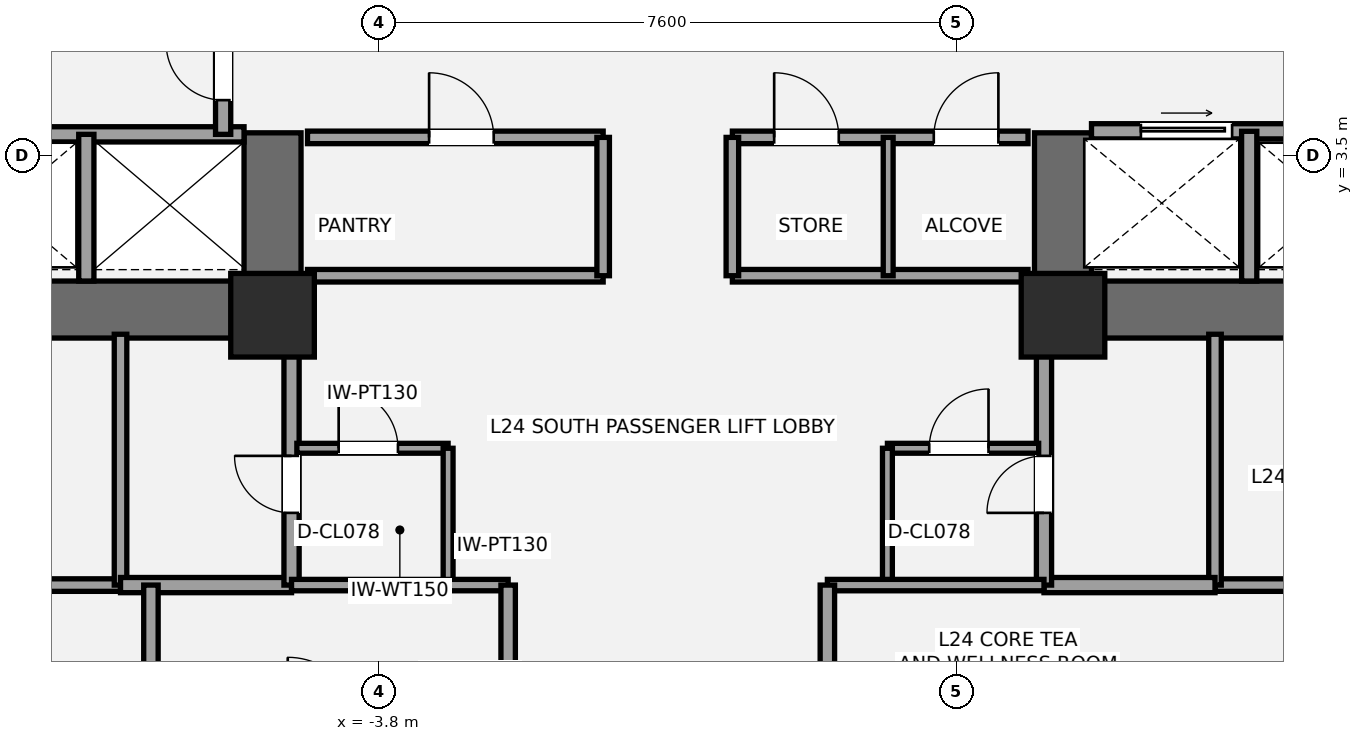
"""IFC4 building model, lengths in metres.
Left out: names, types, materials, properties, quantities, classifications, styles, units other than length and angle.
Written with IfcOpenShell. Run it as: python <this file> out.ifc"""

import sys

from ifc_helpers import new_model, si_unit, direction, frame, frame_2d, origin, origin_2d, place, context, subcontext, project, spatial, rectangle, extrude, element, fill, save


model = new_model("IFC4")
c1 = context("Model", 3, precision=1e-05, world=origin(), true_north=direction((0.0, 1.0)))
c2 = subcontext(c1, "Body", "Model", "MODEL_VIEW")
j1 = project(units=[si_unit("LENGTHUNIT", "METRE"), si_unit("PLANEANGLEUNIT", "RADIAN")], contexts=[c1])
p1 = place(None, origin())
s1 = spatial("IfcSite", under=j1, at=p1, CompositionType="ELEMENT")
p2 = place(p1, origin())
s2 = spatial("IfcBuilding", under=s1, at=p2, CompositionType="ELEMENT")
p3 = place(p2, frame((0.0, 0.0, 93.1)))
s3 = spatial("IfcBuildingStorey", under=s2, at=p3, CompositionType="ELEMENT", Elevation=93.1)
p4 = place(p3, frame((-4.825, 1.475, 0.0), z_axis=(0.0, 0.0, 1.0), x_axis=(-1.0, 0.0, 0.0)))
e1 = element("IfcWall", 1, at=p4, inside=s3, PredefinedType="SHEAR", context=c2, shape_type="SweptSolid", body=[
    extrude(rectangle(XDim=9.075, YDim=0.75, at=frame_2d((4.538, 0.0))), origin(), (0.0, 0.0, 1.0), 3.5),
])
p5 = place(p4, frame((5.475, 0.0, 0.0)))
e2 = element("IfcOpeningElement", 2, at=p5, cuts=e1, PredefinedType="OPENING", context=c2, shape_type="SweptSolid", body=[
    extrude(rectangle(XDim=1.05, YDim=2.15, at=frame_2d((0.525, 1.075))), frame((0.0, 0.385, 0.0), z_axis=(0.0, -1.0, 0.0), x_axis=(1.0, 0.0, 0.0)), (0.0, 0.0, 1.0), 0.77),
])
p6 = place(p4, frame((3.805, 0.0, 0.0)))
e3 = element("IfcOpeningElement", 3, at=p6, cuts=e1, PredefinedType="OPENING", context=c2, shape_type="SweptSolid", body=[
    extrude(rectangle(XDim=1.1, YDim=2.2, at=frame_2d((0.55, 1.1))), frame((0.0, 0.385, 0.0), z_axis=(0.0, -1.0, 0.0), x_axis=(1.0, 0.0, 0.0)), (0.0, 0.0, 1.0), 0.77),
])
p7 = place(p3, frame((-5.2, 1.1, 0.0), z_axis=(0.0, 0.0, 1.0), x_axis=(0.0, 1.0, 0.0)))
e4 = element("IfcWall", 4, at=p7, inside=s3, PredefinedType="SHEAR", context=c2, shape_type="SweptSolid", body=[
    extrude(rectangle(XDim=2.7, YDim=0.75, at=frame_2d((1.35, 0.0))), origin(), (0.0, 0.0, 1.0), 3.5),
])
p8 = place(p3, frame((13.9, 1.475, 0.0), z_axis=(0.0, 0.0, 1.0), x_axis=(-1.0, 0.0, 0.0)))
e5 = element("IfcWall", 5, at=p8, inside=s3, PredefinedType="SHEAR", context=c2, shape_type="SweptSolid", body=[
    extrude(rectangle(XDim=9.075, YDim=0.75, at=frame_2d((4.538, 0.0))), origin(), (0.0, 0.0, 1.0), 3.5),
])
p9 = place(p8, frame((2.55, 0.0, 0.0)))
e6 = element("IfcOpeningElement", 6, at=p9, cuts=e5, PredefinedType="OPENING", context=c2, shape_type="SweptSolid", body=[
    extrude(rectangle(XDim=1.05, YDim=2.15, at=frame_2d((0.525, 1.075))), frame((0.0, 0.385, 0.0), z_axis=(0.0, -1.0, 0.0), x_axis=(1.0, 0.0, 0.0)), (0.0, 0.0, 1.0), 0.77),
])
p10 = place(p8, frame((4.55, 0.0, 0.0)))
e7 = element("IfcOpeningElement", 7, at=p10, cuts=e5, PredefinedType="OPENING", context=c2, shape_type="SweptSolid", body=[
    extrude(rectangle(XDim=1.1, YDim=2.2, at=frame_2d((0.55, 1.1))), frame((0.0, 0.385, 0.0), z_axis=(0.0, -1.0, 0.0), x_axis=(1.0, 0.0, 0.0)), (0.0, 0.0, 1.0), 0.77),
])
p11 = place(p3, frame((5.2, 1.1, 0.0), z_axis=(0.0, 0.0, 1.0), x_axis=(0.0, 1.0, 0.0)))
e8 = element("IfcWall", 8, at=p11, inside=s3, PredefinedType="SHEAR", context=c2, shape_type="SweptSolid", body=[
    extrude(rectangle(XDim=2.7, YDim=0.75, at=frame_2d((1.35, 0.0))), origin(), (0.0, 0.0, 1.0), 3.5),
])
for number, where, z_axis, x_axis in (
    (9, (-5.2, 1.4, 0.0), (0.0, 0.0, 1.0), (1.0, 0.0, 0.0)),
    (10, (5.2, 1.4, 0.0), (0.0, 0.0, 1.0), (1.0, 0.0, 0.0)),
):
    element("IfcColumn", number, at=place(p3, frame(where, z_axis=z_axis, x_axis=x_axis)), inside=s3, PredefinedType="COLUMN", context=c2, shape_type="SweptSolid", body=[
        extrude(rectangle(XDim=1.1, YDim=1.1, at=origin_2d()), origin(), (0.0, 0.0, 1.0), 3.5),
    ])
p12 = place(p3, frame((-13.45, -2.15, 0.0), z_axis=(0.0, 0.0, 1.0), x_axis=(1.0, 0.0, 0.0)))
e11 = element("IfcWall", 11, at=p12, inside=s3, PredefinedType="PARTITIONING", context=c2, shape_type="SweptSolid", body=[
    extrude(rectangle(XDim=6.25, YDim=0.165, at=frame_2d((3.125, 0.0))), origin(), (0.0, 0.0, 1.0), 3.31),
])
p13 = place(p3, frame((-7.2, -2.15, 0.0), z_axis=(0.0, 0.0, 1.0), x_axis=(0.0, 1.0, 0.0)))
e12 = element("IfcWall", 12, at=p13, inside=s3, PredefinedType="PARTITIONING", context=c2, shape_type="SweptSolid", body=[
    extrude(rectangle(XDim=3.3, YDim=0.165, at=frame_2d((1.65, 0.0))), origin(), (0.0, 0.0, 1.0), 2.763),
])
p14 = place(p3, frame((-7.2, -2.15, 0.0), z_axis=(0.0, 0.0, 1.0), x_axis=(1.0, 0.0, 0.0)))
e13 = element("IfcWall", 13, at=p14, inside=s3, PredefinedType="SOLIDWALL", context=c2, shape_type="SweptSolid", body=[
    extrude(rectangle(XDim=2.25, YDim=0.2, at=frame_2d((1.125, 0.0))), origin(), (0.0, 0.0, 1.0), 3.31),
])
p15 = place(p3, frame((-4.95, -2.15, 0.0), z_axis=(0.0, 0.0, 1.0), x_axis=(0.0, 1.0, 0.0)))
e14 = element("IfcWall", 14, at=p15, inside=s3, PredefinedType="SOLIDWALL", context=c2, shape_type="SweptSolid", body=[
    extrude(rectangle(XDim=3.3, YDim=0.2, at=frame_2d((1.65, 0.0))), origin(), (0.0, 0.0, 1.0), 2.763),
])
p16 = place(p15, frame((0.95, 0.0, 0.0)))
e15 = element("IfcOpeningElement", 15, at=p16, cuts=e14, PredefinedType="OPENING", context=c2, shape_type="SweptSolid", body=[
    extrude(rectangle(XDim=0.75, YDim=2.1, at=frame_2d((0.375, 1.05))), frame((0.0, 0.11, 0.0), z_axis=(0.0, -1.0, 0.0), x_axis=(1.0, 0.0, 0.0)), (0.0, 0.0, 1.0), 0.22),
])
p17 = place(p3, frame((7.2, -2.15, 0.0), z_axis=(0.0, 0.0, 1.0), x_axis=(1.0, 0.0, 0.0)))
e16 = element("IfcWall", 16, at=p17, inside=s3, PredefinedType="PARTITIONING", context=c2, shape_type="SweptSolid", body=[
    extrude(rectangle(XDim=6.25, YDim=0.165, at=frame_2d((3.125, 0.0))), origin(), (0.0, 0.0, 1.0), 3.31),
])
p18 = place(p3, frame((7.2, -2.15, 0.0), z_axis=(0.0, 0.0, 1.0), x_axis=(0.0, 1.0, 0.0)))
e17 = element("IfcWall", 17, at=p18, inside=s3, PredefinedType="PARTITIONING", context=c2, shape_type="SweptSolid", body=[
    extrude(rectangle(XDim=3.3, YDim=0.165, at=frame_2d((1.65, 0.0))), origin(), (0.0, 0.0, 1.0), 3.31),
])
p19 = place(p3, frame((4.95, -2.15, 0.0), z_axis=(0.0, 0.0, 1.0), x_axis=(1.0, 0.0, 0.0)))
e18 = element("IfcWall", 18, at=p19, inside=s3, PredefinedType="SOLIDWALL", context=c2, shape_type="SweptSolid", body=[
    extrude(rectangle(XDim=2.25, YDim=0.2, at=frame_2d((1.125, 0.0))), origin(), (0.0, 0.0, 1.0), 2.763),
])
p20 = place(p3, frame((4.95, -2.15, 0.0), z_axis=(0.0, 0.0, 1.0), x_axis=(0.0, 1.0, 0.0)))
e19 = element("IfcWall", 19, at=p20, inside=s3, PredefinedType="SOLIDWALL", context=c2, shape_type="SweptSolid", body=[
    extrude(rectangle(XDim=3.3, YDim=0.2, at=frame_2d((1.65, 0.0))), origin(), (0.0, 0.0, 1.0), 3.31),
])
p21 = place(p20, frame((0.95, 0.0, 0.0)))
e20 = element("IfcOpeningElement", 20, at=p21, cuts=e19, PredefinedType="OPENING", context=c2, shape_type="SweptSolid", body=[
    extrude(rectangle(XDim=0.75, YDim=2.1, at=frame_2d((0.375, 1.05))), frame((0.0, 0.11, 0.0), z_axis=(0.0, -1.0, 0.0), x_axis=(1.0, 0.0, 0.0)), (0.0, 0.0, 1.0), 0.22),
])
p22 = place(p3, frame((-4.88, -0.35, 0.0), z_axis=(0.0, 0.0, 1.0), x_axis=(1.0, 0.0, 0.0)))
e21 = element("IfcWall", 21, at=p22, inside=s3, PredefinedType="PARTITIONING", context=c2, shape_type="SweptSolid", body=[
    extrude(rectangle(XDim=1.99, YDim=0.13, at=frame_2d((0.995, 0.0))), origin(), (0.0, 0.0, 1.0), 3.31),
])
p23 = place(p22, frame((0.55, 0.0, 0.0)))
e22 = element("IfcOpeningElement", 22, at=p23, cuts=e21, PredefinedType="OPENING", context=c2, shape_type="SweptSolid", body=[
    extrude(rectangle(XDim=0.78, YDim=2.1, at=frame_2d((0.39, 1.05))), frame((0.0, 0.075, 0.0), z_axis=(0.0, -1.0, 0.0), x_axis=(1.0, 0.0, 0.0)), (0.0, 0.0, 1.0), 0.15),
])
p24 = place(p3, frame((-2.89, -2.15, 0.0), z_axis=(0.0, 0.0, 1.0), x_axis=(0.0, 1.0, 0.0)))
e23 = element("IfcWall", 23, at=p24, inside=s3, PredefinedType="PARTITIONING", context=c2, shape_type="SweptSolid", body=[
    extrude(rectangle(XDim=1.8, YDim=0.13, at=frame_2d((0.9, 0.0))), origin(), (0.0, 0.0, 1.0), 3.31),
])
p25 = place(p3, frame((2.89, -0.35, 0.0), z_axis=(0.0, 0.0, 1.0), x_axis=(1.0, 0.0, 0.0)))
e24 = element("IfcWall", 24, at=p25, inside=s3, PredefinedType="PARTITIONING", context=c2, shape_type="SweptSolid", body=[
    extrude(rectangle(XDim=1.99, YDim=0.13, at=frame_2d((0.995, 0.0))), origin(), (0.0, 0.0, 1.0), 3.31),
])
p26 = place(p25, frame((0.55, 0.0, 0.0)))
e25 = element("IfcOpeningElement", 25, at=p26, cuts=e24, PredefinedType="OPENING", context=c2, shape_type="SweptSolid", body=[
    extrude(rectangle(XDim=0.78, YDim=2.1, at=frame_2d((0.39, 1.05))), frame((0.0, 0.075, 0.0), z_axis=(0.0, -1.0, 0.0), x_axis=(1.0, 0.0, 0.0)), (0.0, 0.0, 1.0), 0.15),
])
p27 = place(p3, frame((2.89, -2.15, 0.0), z_axis=(0.0, 0.0, 1.0), x_axis=(0.0, 1.0, 0.0)))
e26 = element("IfcWall", 26, at=p27, inside=s3, PredefinedType="PARTITIONING", context=c2, shape_type="SweptSolid", body=[
    extrude(rectangle(XDim=1.8, YDim=0.13, at=frame_2d((0.9, 0.0))), origin(), (0.0, 0.0, 1.0), 3.31),
])
p28 = place(p3, frame((-9.78, 3.78, 0.0), z_axis=(0.0, 0.0, 1.0), x_axis=(1.0, 0.0, 0.0)))
e27 = element("IfcWall", 27, at=p28, inside=s3, PredefinedType="SOLIDWALL", context=c2, shape_type="SweptSolid", body=[
    extrude(rectangle(XDim=4.205, YDim=0.2, at=frame_2d((2.103, 0.0))), origin(), (0.0, 0.0, 1.0), 3.31),
])
p29 = place(p3, frame((-7.65, 1.85, 0.0), z_axis=(0.0, 0.0, 1.0), x_axis=(0.0, 1.0, 0.0)))
e28 = element("IfcWall", 28, at=p29, inside=s3, PredefinedType="SOLIDWALL", context=c2, shape_type="SweptSolid", body=[
    extrude(rectangle(XDim=1.93, YDim=0.2, at=frame_2d((0.965, 0.0))), origin(), (0.0, 0.0, 1.0), 3.31),
])
p30 = place(p3, frame((-5.85, 3.78, 0.0), z_axis=(0.0, 0.0, 1.0), x_axis=(0.0, 1.0, 0.0)))
e29 = element("IfcWall", 29, at=p30, inside=s3, PredefinedType="SOLIDWALL", context=c2, shape_type="SweptSolid", body=[
    extrude(rectangle(XDim=1.69, YDim=0.2, at=frame_2d((0.845, 0.0))), origin(), (0.0, 0.0, 1.0), 3.31),
])
p31 = place(p30, frame((0.45, 0.0, 0.0)))
e30 = element("IfcOpeningElement", 30, at=p31, cuts=e29, PredefinedType="OPENING", context=c2, shape_type="SweptSolid", body=[
    extrude(rectangle(XDim=0.75, YDim=2.1, at=frame_2d((0.375, 1.05))), frame((0.0, 0.11, 0.0), z_axis=(0.0, -1.0, 0.0), x_axis=(1.0, 0.0, 0.0)), (0.0, 0.0, 1.0), 0.22),
])
p32 = place(p3, frame((5.575, 3.82, 0.0), z_axis=(0.0, 0.0, 1.0), x_axis=(1.0, 0.0, 0.0)))
e31 = element("IfcWall", 31, at=p32, inside=s3, PredefinedType="SOLIDWALL", context=c2, shape_type="SweptSolid", body=[
    extrude(rectangle(XDim=4.205, YDim=0.2, at=frame_2d((2.103, 0.0))), origin(), (0.0, 0.0, 1.0), 3.31),
])
p33 = place(p32, frame((0.65, 0.0, 0.0)))
e32 = element("IfcOpeningElement", 32, at=p33, cuts=e31, PredefinedType="OPENING", context=c2, shape_type="SweptSolid", body=[
    extrude(rectangle(XDim=1.2, YDim=2.2, at=frame_2d((0.6, 1.1))), frame((0.0, 0.11, 0.0), z_axis=(0.0, -1.0, 0.0), x_axis=(1.0, 0.0, 0.0)), (0.0, 0.0, 1.0), 0.22),
])
p34 = place(p3, frame((7.65, 1.85, 0.0), z_axis=(0.0, 0.0, 1.0), x_axis=(0.0, 1.0, 0.0)))
e33 = element("IfcWall", 33, at=p34, inside=s3, PredefinedType="SOLIDWALL", context=c2, shape_type="SweptSolid", body=[
    extrude(rectangle(XDim=1.97, YDim=0.2, at=frame_2d((0.985, 0.0))), origin(), (0.0, 0.0, 1.0), 3.31),
])
p35 = place(p3, frame((-4.74, 1.92, 0.0), z_axis=(0.0, 0.0, 1.0), x_axis=(1.0, 0.0, 0.0)))
e34 = element("IfcWall", 34, at=p35, inside=s3, PredefinedType="PARTITIONING", context=c2, shape_type="SweptSolid", body=[
    extrude(rectangle(XDim=3.89, YDim=0.165, at=frame_2d((1.945, 0.0))), origin(), (0.0, 0.0, 1.0), 2.3),
])
p36 = place(p3, frame((-4.74, 3.74, 0.0), z_axis=(0.0, 0.0, 1.0), x_axis=(1.0, 0.0, 0.0)))
e35 = element("IfcWall", 35, at=p36, inside=s3, PredefinedType="PARTITIONING", context=c2, shape_type="SweptSolid", body=[
    extrude(rectangle(XDim=3.89, YDim=0.165, at=frame_2d((1.945, 0.0))), origin(), (0.0, 0.0, 1.0), 3.31),
])
p37 = place(p36, frame((1.6, 0.0, 0.0)))
e36 = element("IfcOpeningElement", 36, at=p37, cuts=e35, PredefinedType="OPENING", context=c2, shape_type="SweptSolid", body=[
    extrude(rectangle(XDim=0.85, YDim=2.1, at=frame_2d((0.425, 1.05))), frame((0.0, 0.093, 0.0), z_axis=(0.0, -1.0, 0.0), x_axis=(1.0, 0.0, 0.0)), (0.0, 0.0, 1.0), 0.185),
])
p38 = place(p3, frame((-0.85, 1.92, 0.0), z_axis=(0.0, 0.0, 1.0), x_axis=(0.0, 1.0, 0.0)))
e37 = element("IfcWall", 37, at=p38, inside=s3, PredefinedType="PARTITIONING", context=c2, shape_type="SweptSolid", body=[
    extrude(rectangle(XDim=1.82, YDim=0.165, at=frame_2d((0.91, 0.0))), origin(), (0.0, 0.0, 1.0), 3.31),
])
p39 = place(p3, frame((0.85, 1.92, 0.0), z_axis=(0.0, 0.0, 1.0), x_axis=(1.0, 0.0, 0.0)))
e38 = element("IfcWall", 38, at=p39, inside=s3, PredefinedType="PARTITIONING", context=c2, shape_type="SweptSolid", body=[
    extrude(rectangle(XDim=3.89, YDim=0.165, at=frame_2d((1.945, 0.0))), origin(), (0.0, 0.0, 1.0), 2.3),
])
p40 = place(p3, frame((0.85, 3.74, 0.0), z_axis=(0.0, 0.0, 1.0), x_axis=(1.0, 0.0, 0.0)))
e39 = element("IfcWall", 39, at=p40, inside=s3, PredefinedType="PARTITIONING", context=c2, shape_type="SweptSolid", body=[
    extrude(rectangle(XDim=3.89, YDim=0.165, at=frame_2d((1.945, 0.0))), origin(), (0.0, 0.0, 1.0), 3.31),
])
p41 = place(p40, frame((0.55, 0.0, 0.0)))
e40 = element("IfcOpeningElement", 40, at=p41, cuts=e39, PredefinedType="OPENING", context=c2, shape_type="SweptSolid", body=[
    extrude(rectangle(XDim=0.85, YDim=2.1, at=frame_2d((0.425, 1.05))), frame((0.0, 0.093, 0.0), z_axis=(0.0, -1.0, 0.0), x_axis=(1.0, 0.0, 0.0)), (0.0, 0.0, 1.0), 0.185),
])
p42 = place(p40, frame((2.65, 0.0, 0.0)))
e41 = element("IfcOpeningElement", 41, at=p42, cuts=e39, PredefinedType="OPENING", context=c2, shape_type="SweptSolid", body=[
    extrude(rectangle(XDim=0.85, YDim=2.1, at=frame_2d((0.425, 1.05))), frame((0.0, 0.093, 0.0), z_axis=(0.0, -1.0, 0.0), x_axis=(1.0, 0.0, 0.0)), (0.0, 0.0, 1.0), 0.185),
])
p43 = place(p3, frame((0.85, 1.92, 0.0), z_axis=(0.0, 0.0, 1.0), x_axis=(0.0, 1.0, 0.0)))
e42 = element("IfcWall", 42, at=p43, inside=s3, PredefinedType="PARTITIONING", context=c2, shape_type="SweptSolid", body=[
    extrude(rectangle(XDim=1.82, YDim=0.165, at=frame_2d((0.91, 0.0))), origin(), (0.0, 0.0, 1.0), 3.31),
])
p44 = place(p3, frame((2.9, 1.92, 0.0), z_axis=(0.0, 0.0, 1.0), x_axis=(0.0, 1.0, 0.0)))
e43 = element("IfcWall", 43, at=p44, inside=s3, PredefinedType="PARTITIONING", context=c2, shape_type="SweptSolid", body=[
    extrude(rectangle(XDim=1.82, YDim=0.13, at=frame_2d((0.91, 0.0))), origin(), (0.0, 0.0, 1.0), 3.31),
])
p45 = place(p3, frame((-4.95, -2.15, 0.0), z_axis=(0.0, 0.0, 1.0), x_axis=(1.0, 0.0, 0.0)))
e44 = element("IfcWall", 44, at=p45, inside=s3, PredefinedType="PLUMBINGWALL", context=c2, shape_type="SweptSolid", body=[
    extrude(rectangle(XDim=2.85, YDim=0.15, at=frame_2d((1.425, 0.0))), origin(), (0.0, 0.0, 1.0), 2.763),
])
p46 = place(p3, frame((-6.8, -4.05, 0.0), z_axis=(0.0, 0.0, 1.0), x_axis=(0.0, 1.0, 0.0)))
e45 = element("IfcWall", 45, at=p46, inside=s3, PredefinedType="PLUMBINGWALL", context=c2, shape_type="SweptSolid", body=[
    extrude(rectangle(XDim=1.9, YDim=0.19, at=frame_2d((0.95, 0.0))), origin(), (0.0, 0.0, 1.0), 2.763),
])
p47 = place(p3, frame((-2.1, -4.05, 0.0), z_axis=(0.0, 0.0, 1.0), x_axis=(0.0, 1.0, 0.0)))
e46 = element("IfcWall", 46, at=p47, inside=s3, PredefinedType="PLUMBINGWALL", context=c2, shape_type="SweptSolid", body=[
    extrude(rectangle(XDim=1.9, YDim=0.19, at=frame_2d((0.95, 0.0))), origin(), (0.0, 0.0, 1.0), 3.31),
])
p48 = place(p3, frame((2.1, -2.15, 0.0), z_axis=(0.0, 0.0, 1.0), x_axis=(1.0, 0.0, 0.0)))
e47 = element("IfcWall", 47, at=p48, inside=s3, PredefinedType="PLUMBINGWALL", context=c2, shape_type="SweptSolid", body=[
    extrude(rectangle(XDim=2.85, YDim=0.15, at=frame_2d((1.425, 0.0))), origin(), (0.0, 0.0, 1.0), 2.763),
])
p49 = place(p3, frame((2.1, -4.05, 0.0), z_axis=(0.0, 0.0, 1.0), x_axis=(0.0, 1.0, 0.0)))
e48 = element("IfcWall", 48, at=p49, inside=s3, PredefinedType="PLUMBINGWALL", context=c2, shape_type="SweptSolid", body=[
    extrude(rectangle(XDim=1.9, YDim=0.19, at=frame_2d((0.95, 0.0))), origin(), (0.0, 0.0, 1.0), 3.31),
])
p50 = place(p16, origin())
e49 = element("IfcDoor", 49, at=p50, inside=s3, OperationType="SINGLE_SWING_RIGHT", PredefinedType="DOOR", context=c2, shape_type="SweptSolid", body=[
    extrude(rectangle(XDim=0.75, YDim=2.1, at=frame_2d((0.375, 1.05))), frame((0.0, 0.025, 0.0), z_axis=(0.0, -1.0, 0.0), x_axis=(1.0, 0.0, 0.0)), (0.0, 0.0, 1.0), 0.05),
])
fill(e15, e49)
p51 = place(p21, origin())
e50 = element("IfcDoor", 50, at=p51, inside=s3, OperationType="SINGLE_SWING_LEFT", PredefinedType="DOOR", context=c2, shape_type="SweptSolid", body=[
    extrude(rectangle(XDim=0.75, YDim=2.1, at=frame_2d((0.375, 1.05))), frame((0.0, 0.025, 0.0), z_axis=(0.0, -1.0, 0.0), x_axis=(1.0, 0.0, 0.0)), (0.0, 0.0, 1.0), 0.05),
])
fill(e20, e50)
p52 = place(p23, origin())
e51 = element("IfcDoor", 51, at=p52, inside=s3, OperationType="SINGLE_SWING_LEFT", PredefinedType="DOOR", context=c2, shape_type="SweptSolid", body=[
    extrude(rectangle(XDim=0.78, YDim=2.1, at=frame_2d((0.39, 1.05))), frame((0.0, 0.025, 0.0), z_axis=(0.0, -1.0, 0.0), x_axis=(1.0, 0.0, 0.0)), (0.0, 0.0, 1.0), 0.05),
])
fill(e22, e51)
p53 = place(p26, origin())
e52 = element("IfcDoor", 52, at=p53, inside=s3, OperationType="SINGLE_SWING_RIGHT", PredefinedType="DOOR", context=c2, shape_type="SweptSolid", body=[
    extrude(rectangle(XDim=0.78, YDim=2.1, at=frame_2d((0.39, 1.05))), frame((0.0, 0.025, 0.0), z_axis=(0.0, -1.0, 0.0), x_axis=(1.0, 0.0, 0.0)), (0.0, 0.0, 1.0), 0.05),
])
fill(e25, e52)
p54 = place(p31, origin())
e53 = element("IfcDoor", 53, at=p54, inside=s3, OperationType="SINGLE_SWING_RIGHT", PredefinedType="DOOR", context=c2, shape_type="SweptSolid", body=[
    extrude(rectangle(XDim=0.75, YDim=2.1, at=frame_2d((0.375, 1.05))), frame((0.0, 0.025, 0.0), z_axis=(0.0, -1.0, 0.0), x_axis=(1.0, 0.0, 0.0)), (0.0, 0.0, 1.0), 0.05),
])
fill(e30, e53)
p55 = place(p33, origin())
e54 = element("IfcDoor", 54, at=p55, inside=s3, OperationType="SLIDING_TO_RIGHT", PredefinedType="DOOR", context=c2, shape_type="SweptSolid", body=[
    extrude(rectangle(XDim=1.2, YDim=2.2, at=frame_2d((0.6, 1.1))), frame((0.0, 0.025, 0.0), z_axis=(0.0, -1.0, 0.0), x_axis=(1.0, 0.0, 0.0)), (0.0, 0.0, 1.0), 0.05),
])
fill(e32, e54)
p56 = place(p37, origin())
e55 = element("IfcDoor", 55, at=p56, inside=s3, OperationType="SINGLE_SWING_LEFT", PredefinedType="DOOR", context=c2, shape_type="SweptSolid", body=[
    extrude(rectangle(XDim=0.85, YDim=2.1, at=frame_2d((0.425, 1.05))), frame((0.0, 0.025, 0.0), z_axis=(0.0, -1.0, 0.0), x_axis=(1.0, 0.0, 0.0)), (0.0, 0.0, 1.0), 0.05),
])
fill(e36, e55)
p57 = place(p41, origin())
e56 = element("IfcDoor", 56, at=p57, inside=s3, OperationType="SINGLE_SWING_LEFT", PredefinedType="DOOR", context=c2, shape_type="SweptSolid", body=[
    extrude(rectangle(XDim=0.85, YDim=2.1, at=frame_2d((0.425, 1.05))), frame((0.0, 0.025, 0.0), z_axis=(0.0, -1.0, 0.0), x_axis=(1.0, 0.0, 0.0)), (0.0, 0.0, 1.0), 0.05),
])
fill(e40, e56)
p58 = place(p42, origin())
e57 = element("IfcDoor", 57, at=p58, inside=s3, OperationType="SINGLE_SWING_RIGHT", PredefinedType="DOOR", context=c2, shape_type="SweptSolid", body=[
    extrude(rectangle(XDim=0.85, YDim=2.1, at=frame_2d((0.425, 1.05))), frame((0.0, 0.025, 0.0), z_axis=(0.0, -1.0, 0.0), x_axis=(1.0, 0.0, 0.0)), (0.0, 0.0, 1.0), 0.05),
])
fill(e41, e57)
save(model, sys.argv[1])
